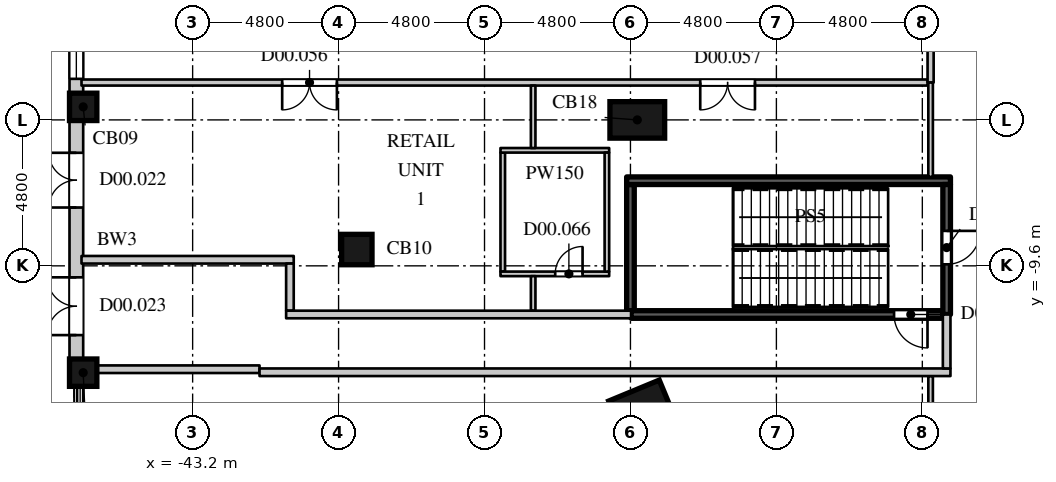
"""IFC4 building model, lengths in metres.
Left out: names, types, materials, properties, quantities, classifications, styles, units other than length and angle.
Written with IfcOpenShell. Run it as: python <this file> out.ifc"""

import sys

from ifc_helpers import new_model, si_unit, direction, frame, frame_2d, origin, origin_2d, place, context, subcontext, project, spatial, rectangle, extrude, element, fill, save


model = new_model("IFC4")
c1 = context("Model", 3, precision=1e-05, world=origin(), true_north=direction((0.0, 1.0)))
c2 = subcontext(c1, "Body", "Model", "MODEL_VIEW")
j1 = project(units=[si_unit("LENGTHUNIT", "METRE"), si_unit("PLANEANGLEUNIT", "RADIAN")], contexts=[c1])
p1 = place(None, origin())
s1 = spatial("IfcSite", under=j1, at=p1, CompositionType="ELEMENT")
p2 = place(p1, origin())
s2 = spatial("IfcBuilding", under=s1, at=p2, CompositionType="ELEMENT")
p3 = place(p2, origin())
s3 = spatial("IfcBuildingStorey", under=s2, at=p3, CompositionType="ELEMENT", Elevation=0.0)
p4 = place(p3, frame((-28.454, -14.257, 0.0), z_axis=(0.0, 0.0, 1.0), x_axis=(0.382683496864, -0.923879505795, 0.0)))
e1 = element("IfcColumn", 1, at=p4, inside=s3, PredefinedType="COLUMN", context=c2, shape_type="SweptSolid", body=[
    extrude(rectangle(XDim=1.2, YDim=1.8, at=origin_2d()), origin(), (0.0, 0.0, 1.0), 6.0),
])
p5 = place(p3, frame((-46.8, -13.114, 0.0), z_axis=(0.0, 0.0, 1.0), x_axis=(1.0, 0.0, 0.0)))
e2 = element("IfcColumn", 2, at=p5, inside=s3, PredefinedType="COLUMN", context=c2, shape_type="SweptSolid", body=[
    extrude(rectangle(XDim=0.9, YDim=0.9, at=origin_2d()), origin(), (0.0, 0.0, 1.0), 6.0),
])
p6 = place(p3, frame((-37.8, -9.064, 0.0), z_axis=(0.0, 0.0, 1.0), x_axis=(1.0, 0.0, 0.0)))
e3 = element("IfcColumn", 3, at=p6, inside=s3, PredefinedType="COLUMN", context=c2, shape_type="SweptSolid", body=[
    extrude(rectangle(XDim=1.0, YDim=1.0, at=origin_2d()), origin(), (0.0, 0.0, 1.0), 6.0),
])
p7 = place(p3, frame((-28.575, -4.8, 0.0), z_axis=(0.0, 0.0, 1.0), x_axis=(0.0, -1.0, 0.0)))
e4 = element("IfcColumn", 4, at=p7, inside=s3, PredefinedType="COLUMN", context=c2, shape_type="SweptSolid", body=[
    extrude(rectangle(XDim=1.2, YDim=1.8, at=origin_2d()), origin(), (0.0, 0.0, 1.0), 6.0),
])
p8 = place(p3, frame((-46.8, -4.371, 0.0), z_axis=(0.0, 0.0, 1.0), x_axis=(1.0, 0.0, 0.0)))
e5 = element("IfcColumn", 5, at=p8, inside=s3, PredefinedType="COLUMN", context=c2, shape_type="SweptSolid", body=[
    extrude(rectangle(XDim=0.9, YDim=0.9, at=origin_2d()), origin(), (0.0, 0.0, 1.0), 6.0),
])
p9 = place(p3, frame((-47.025, 3.921, 0.0), z_axis=(0.0, 0.0, 1.0), x_axis=(0.0, -1.0, 0.0)))
e6 = element("IfcWall", 6, at=p9, inside=s3, PredefinedType="ELEMENTEDWALL", context=c2, shape_type="SweptSolid", body=[
    extrude(rectangle(XDim=7.842, YDim=0.45, at=frame_2d((3.921, 0.0))), origin(), (0.0, 0.0, 1.0), 4.8),
])
p10 = place(p9, frame((0.961, 0.0, 0.0)))
e7 = element("IfcOpeningElement", 7, at=p10, cuts=e6, PredefinedType="OPENING", context=c2, shape_type="SweptSolid", body=[
    extrude(rectangle(XDim=2.0, YDim=2.7, at=frame_2d((1.0, 1.35))), frame((0.0, 0.235, 0.0), z_axis=(0.0, -1.0, 0.0), x_axis=(1.0, 0.0, 0.0)), (0.0, 0.0, 1.0), 0.47),
])
p11 = place(p9, frame((4.371, 0.0, 1.05)))
e8 = element("IfcOpeningElement", 8, at=p11, cuts=e6, PredefinedType="OPENING", context=c2, shape_type="SweptSolid", body=[
    extrude(rectangle(XDim=3.0, YDim=2.7, at=frame_2d((1.5, 1.35))), frame((0.0, 0.235, 0.0), z_axis=(0.0, -1.0, 0.0), x_axis=(1.0, 0.0, 0.0)), (0.0, 0.0, 1.0), 0.47),
])
p12 = place(p3, frame((-47.025, -4.821, 0.0), z_axis=(0.0, 0.0, 1.0), x_axis=(0.0, -1.0, 0.0)))
e9 = element("IfcWall", 9, at=p12, inside=s3, PredefinedType="ELEMENTEDWALL", context=c2, shape_type="SweptSolid", body=[
    extrude(rectangle(XDim=7.842, YDim=0.45, at=frame_2d((3.921, 0.0))), origin(), (0.0, 0.0, 1.0), 4.8),
])
p13 = place(p12, frame((1.061, 0.0, 0.0)))
e10 = element("IfcOpeningElement", 10, at=p13, cuts=e9, PredefinedType="OPENING", context=c2, shape_type="SweptSolid", body=[
    extrude(rectangle(XDim=1.8, YDim=2.7, at=frame_2d((0.9, 1.35))), frame((0.0, 0.235, 0.0), z_axis=(0.0, -1.0, 0.0), x_axis=(1.0, 0.0, 0.0)), (0.0, 0.0, 1.0), 0.47),
])
p14 = place(p12, frame((5.157, 0.0, 0.0)))
e11 = element("IfcOpeningElement", 11, at=p14, cuts=e9, PredefinedType="OPENING", context=c2, shape_type="SweptSolid", body=[
    extrude(rectangle(XDim=1.9, YDim=2.7, at=frame_2d((0.95, 1.35))), frame((0.0, 0.235, 0.0), z_axis=(0.0, -1.0, 0.0), x_axis=(1.0, 0.0, 0.0)), (0.0, 0.0, 1.0), 0.47),
])
p15 = place(p3, frame((-46.855, -3.571, 0.0), z_axis=(0.0, 0.0, 1.0), x_axis=(1.0, 0.0, 0.0)))
e12 = element("IfcWall", 12, at=p15, inside=s3, PredefinedType="PARTITIONING", context=c2, shape_type="SweptSolid", body=[
    extrude(rectangle(XDim=27.827, YDim=0.2, at=frame_2d((13.914, 0.0))), origin(), (0.0, 0.0, 1.0), 5.65),
])
p16 = place(p15, frame((6.6, 0.0, 0.0)))
e13 = element("IfcOpeningElement", 13, at=p16, cuts=e12, PredefinedType="OPENING", context=c2, shape_type="SweptSolid", body=[
    extrude(rectangle(XDim=1.8, YDim=2.4, at=frame_2d((0.9, 1.2))), frame((0.0, 0.11, 0.0), z_axis=(0.0, -1.0, 0.0), x_axis=(1.0, 0.0, 0.0)), (0.0, 0.0, 1.0), 0.22),
])
p17 = place(p15, frame((20.35, 0.0, 0.0)))
e14 = element("IfcOpeningElement", 14, at=p17, cuts=e12, PredefinedType="OPENING", context=c2, shape_type="SweptSolid", body=[
    extrude(rectangle(XDim=1.8, YDim=2.4, at=frame_2d((0.9, 1.2))), frame((0.0, 0.11, 0.0), z_axis=(0.0, -1.0, 0.0), x_axis=(1.0, 0.0, 0.0)), (0.0, 0.0, 1.0), 0.22),
])
p18 = place(p3, frame((-18.928, -3.571, 0.0), z_axis=(0.0, 0.0, 1.0), x_axis=(0.0, 1.0, 0.0)))
e15 = element("IfcWall", 15, at=p18, inside=s3, PredefinedType="PARTITIONING", context=c2, shape_type="SweptSolid", body=[
    extrude(rectangle(XDim=9.371, YDim=0.2, at=frame_2d((4.686, 0.0))), origin(), (0.0, 0.0, 1.0), 5.65),
])
p19 = place(p18, frame((3.95, 0.0, 0.0)))
e16 = element("IfcOpeningElement", 16, at=p19, cuts=e15, PredefinedType="OPENING", context=c2, shape_type="SweptSolid", body=[
    extrude(rectangle(XDim=1.5, YDim=2.2, at=frame_2d((0.75, 1.1))), frame((0.0, 0.11, 0.0), z_axis=(0.0, -1.0, 0.0), x_axis=(1.0, 0.0, 0.0)), (0.0, 0.0, 1.0), 0.22),
])
p20 = place(p3, frame((-33.0, -9.789, 0.0), z_axis=(0.0, 0.0, 1.0), x_axis=(0.0, 1.0, 0.0)))
e17 = element("IfcWall", 17, at=p20, inside=s3, PredefinedType="PARTITIONING", context=c2, shape_type="SweptSolid", body=[
    extrude(rectangle(XDim=3.914, YDim=0.15, at=frame_2d((1.957, 0.0))), origin(), (0.0, 0.0, 1.0), 5.65),
])
p21 = place(p3, frame((-33.075, -9.864, 0.0), z_axis=(0.0, 0.0, 1.0), x_axis=(1.0, 0.0, 0.0)))
e18 = element("IfcWall", 18, at=p21, inside=s3, PredefinedType="PARTITIONING", context=c2, shape_type="SweptSolid", body=[
    extrude(rectangle(XDim=3.575, YDim=0.15, at=frame_2d((1.788, 0.0))), origin(), (0.0, 0.0, 1.0), 5.65),
])
p22 = place(p21, frame((1.8, 0.0, 0.0)))
e19 = element("IfcOpeningElement", 19, at=p22, cuts=e18, PredefinedType="OPENING", context=c2, shape_type="SweptSolid", body=[
    extrude(rectangle(XDim=0.9, YDim=2.2, at=frame_2d((0.45, 1.1))), frame((0.0, 0.085, 0.0), z_axis=(0.0, -1.0, 0.0), x_axis=(1.0, 0.0, 0.0)), (0.0, 0.0, 1.0), 0.17),
])
p23 = place(p3, frame((-33.075, -5.8, 0.0), z_axis=(0.0, 0.0, 1.0), x_axis=(1.0, 0.0, 0.0)))
e20 = element("IfcWall", 20, at=p23, inside=s3, PredefinedType="PARTITIONING", context=c2, shape_type="SweptSolid", body=[
    extrude(rectangle(XDim=3.575, YDim=0.15, at=frame_2d((1.788, 0.0))), origin(), (0.0, 0.0, 1.0), 5.65),
])
p24 = place(p3, frame((-32.0, -11.075, 0.0), z_axis=(0.0, 0.0, 1.0), x_axis=(0.0, 1.0, 0.0)))
e21 = element("IfcWall", 21, at=p24, inside=s3, PredefinedType="PARTITIONING", context=c2, shape_type="SweptSolid", body=[
    extrude(rectangle(XDim=1.136, YDim=0.15, at=frame_2d((0.568, 0.0))), origin(), (0.0, 0.0, 1.0), 5.65),
])
p25 = place(p3, frame((-32.0, -5.725, 0.0), z_axis=(0.0, 0.0, 1.0), x_axis=(0.0, 1.0, 0.0)))
e22 = element("IfcWall", 22, at=p25, inside=s3, PredefinedType="PARTITIONING", context=c2, shape_type="SweptSolid", body=[
    extrude(rectangle(XDim=2.054, YDim=0.15, at=frame_2d((1.027, 0.0))), origin(), (0.0, 0.0, 1.0), 5.65),
])
p26 = place(p3, frame((-29.575, -9.789, 0.0), z_axis=(0.0, 0.0, 1.0), x_axis=(0.0, 1.0, 0.0)))
e23 = element("IfcWall", 23, at=p26, inside=s3, PredefinedType="PARTITIONING", context=c2, shape_type="SweptSolid", body=[
    extrude(rectangle(XDim=3.914, YDim=0.15, at=frame_2d((1.957, 0.0))), origin(), (0.0, 0.0, 1.0), 5.65),
])
p27 = place(p3, frame((-18.928, -29.925, 0.0), z_axis=(0.0, 0.0, 1.0), x_axis=(0.0, 1.0, 0.0)))
e24 = element("IfcWall", 24, at=p27, inside=s3, PredefinedType="PARTITIONING", context=c2, shape_type="SweptSolid", body=[
    extrude(rectangle(XDim=16.7, YDim=0.15, at=frame_2d((8.35, 0.0))), origin(), (0.0, 0.0, 1.0), 5.65),
])
p28 = place(p3, frame((-18.928, -6.675, 0.0), z_axis=(0.0, 0.0, 1.0), x_axis=(0.0, 1.0, 0.0)))
e25 = element("IfcWall", 25, at=p28, inside=s3, PredefinedType="PARTITIONING", context=c2, shape_type="SweptSolid", body=[
    extrude(rectangle(XDim=3.104, YDim=0.15, at=frame_2d((1.552, 0.0))), origin(), (0.0, 0.0, 1.0), 5.65),
])
p29 = place(p3, frame((-28.8, -11.075, 0.0), z_axis=(0.0, 0.0, 1.0), x_axis=(0.0, 1.0, 0.0)))
e26 = element("IfcWall", 26, at=p29, inside=s3, PredefinedType="SHEAR", context=c2, shape_type="SweptSolid", body=[
    extrude(rectangle(XDim=4.15, YDim=0.25, at=frame_2d((2.075, 0.0))), origin(), (0.0, 0.0, 1.0), 5.65),
])
p30 = place(p3, frame((-28.78, -11.2, 0.0), z_axis=(0.0, 0.0, 1.0), x_axis=(1.0, 0.0, 0.0)))
e27 = element("IfcWall", 27, at=p30, inside=s3, PredefinedType="SHEAR", context=c2, shape_type="SweptSolid", body=[
    extrude(rectangle(XDim=10.255, YDim=0.25, at=frame_2d((5.127, 0.0))), origin(), (0.0, 0.0, 1.0), 5.65),
])
p31 = place(p30, frame((8.65, 0.0, 0.0)))
e28 = element("IfcOpeningElement", 28, at=p31, cuts=e27, PredefinedType="OPENING", context=c2, shape_type="SweptSolid", body=[
    extrude(rectangle(XDim=1.1, YDim=2.2, at=frame_2d((0.55, 1.1))), frame((0.0, 0.135, 0.0), z_axis=(0.0, -1.0, 0.0), x_axis=(1.0, 0.0, 0.0)), (0.0, 0.0, 1.0), 0.27),
])
p32 = place(p3, frame((-28.925, -6.8, 0.0), z_axis=(0.0, 0.0, 1.0), x_axis=(1.0, 0.0, 0.0)))
e29 = element("IfcWall", 29, at=p32, inside=s3, PredefinedType="SHEAR", context=c2, shape_type="SweptSolid", body=[
    extrude(rectangle(XDim=10.65, YDim=0.25, at=frame_2d((5.325, 0.0))), origin(), (0.0, 0.0, 1.0), 5.65),
])
p33 = place(p3, frame((-18.4, -11.2, 0.0), z_axis=(0.0, 0.0, 1.0), x_axis=(0.0, 1.0, 0.0)))
e30 = element("IfcWall", 30, at=p33, inside=s3, PredefinedType="SHEAR", context=c2, shape_type="SweptSolid", body=[
    extrude(rectangle(XDim=4.275, YDim=0.25, at=frame_2d((2.137, 0.0))), origin(), (0.0, 0.0, 1.0), 5.65),
])
p34 = place(p33, frame((1.65, 0.0, 0.0)))
e31 = element("IfcOpeningElement", 31, at=p34, cuts=e30, PredefinedType="OPENING", context=c2, shape_type="SweptSolid", body=[
    extrude(rectangle(XDim=1.1, YDim=2.2, at=frame_2d((0.55, 1.1))), frame((0.0, 0.135, 0.0), z_axis=(0.0, -1.0, 0.0), x_axis=(1.0, 0.0, 0.0)), (0.0, 0.0, 1.0), 0.27),
])
p35 = place(p3, frame((-46.35, -13.0, 0.0), z_axis=(0.0, 0.0, 1.0), x_axis=(1.0, 0.0, 0.0)))
e32 = element("IfcWall", 32, at=p35, inside=s3, PredefinedType="PARTITIONING", context=c2, shape_type="SweptSolid", body=[
    extrude(rectangle(XDim=5.35, YDim=0.25, at=frame_2d((2.675, 0.0))), origin(), (0.0, 0.0, 1.0), 5.65),
])
p36 = place(p3, frame((-46.855, -9.4, 0.0), z_axis=(0.0, 0.0, 1.0), x_axis=(1.0, 0.0, 0.0)))
e33 = element("IfcWall", 33, at=p36, inside=s3, PredefinedType="PARTITIONING", context=c2, shape_type="SweptSolid", body=[
    extrude(rectangle(XDim=6.98, YDim=0.25, at=frame_2d((3.49, 0.0))), origin(), (0.0, 0.0, 1.0), 5.65),
])
p37 = place(p3, frame((-41.0, -13.1, 0.0), z_axis=(0.0, 0.0, 1.0), x_axis=(1.0, 0.0, 0.0)))
e34 = element("IfcWall", 34, at=p37, inside=s3, PredefinedType="PARTITIONING", context=c2, shape_type="SweptSolid", body=[
    extrude(rectangle(XDim=22.725, YDim=0.25, at=frame_2d((11.363, 0.0))), origin(), (0.0, 0.0, 1.0), 5.65),
])
p38 = place(p3, frame((-40.0, -11.075, 0.0), z_axis=(0.0, 0.0, 1.0), x_axis=(0.0, 1.0, 0.0)))
e35 = element("IfcWall", 35, at=p38, inside=s3, PredefinedType="PARTITIONING", context=c2, shape_type="SweptSolid", body=[
    extrude(rectangle(XDim=1.55, YDim=0.25, at=frame_2d((0.775, 0.0))), origin(), (0.0, 0.0, 1.0), 5.65),
])
p39 = place(p3, frame((-40.125, -11.2, 0.0), z_axis=(0.0, 0.0, 1.0), x_axis=(1.0, 0.0, 0.0)))
e36 = element("IfcWall", 36, at=p39, inside=s3, PredefinedType="PARTITIONING", context=c2, shape_type="SweptSolid", body=[
    extrude(rectangle(XDim=11.345, YDim=0.25, at=frame_2d((5.672, 0.0))), origin(), (0.0, 0.0, 1.0), 5.65),
])
p40 = place(p3, frame((-18.4, -12.975, 0.0), z_axis=(0.0, 0.0, 1.0), x_axis=(0.0, 1.0, 0.0)))
e37 = element("IfcWall", 37, at=p40, inside=s3, PredefinedType="PARTITIONING", context=c2, shape_type="SweptSolid", body=[
    extrude(rectangle(XDim=1.775, YDim=0.25, at=frame_2d((0.888, 0.0))), origin(), (0.0, 0.0, 1.0), 5.65),
])
p41 = place(p11, origin())
e38 = element("IfcWindow", 38, at=p41, inside=s3, PartitioningType="SINGLE_PANEL", PredefinedType="WINDOW", context=c2, shape_type="SweptSolid", body=[
    extrude(rectangle(XDim=3.0, YDim=2.7, at=frame_2d((1.5, 1.35))), frame((0.0, 0.135, 0.0), z_axis=(0.0, -1.0, 0.0), x_axis=(1.0, 0.0, 0.0)), (0.0, 0.0, 1.0), 0.06),
])
fill(e8, e38)
p42 = place(p13, frame((1.8, 0.0, 0.0), z_axis=(0.0, 0.0, 1.0), x_axis=(-1.0, 0.0, 0.0)))
e39 = element("IfcDoor", 39, at=p42, inside=s3, OperationType="DOUBLE_DOOR_SINGLE_SWING", PredefinedType="DOOR", context=c2, shape_type="SweptSolid", body=[
    extrude(rectangle(XDim=1.8, YDim=2.7, at=frame_2d((0.9, 1.35))), frame((0.0, -0.08, 0.0), z_axis=(0.0, -1.0, 0.0), x_axis=(1.0, 0.0, 0.0)), (0.0, 0.0, 1.0), 0.05),
])
fill(e10, e39)
p43 = place(p14, frame((1.9, 0.0, 0.0), z_axis=(0.0, 0.0, 1.0), x_axis=(-1.0, 0.0, 0.0)))
e40 = element("IfcDoor", 40, at=p43, inside=s3, OperationType="DOUBLE_DOOR_SINGLE_SWING", PredefinedType="DOOR", context=c2, shape_type="SweptSolid", body=[
    extrude(rectangle(XDim=1.9, YDim=2.7, at=frame_2d((0.95, 1.35))), frame((0.0, -0.08, 0.0), z_axis=(0.0, -1.0, 0.0), x_axis=(1.0, 0.0, 0.0)), (0.0, 0.0, 1.0), 0.05),
])
fill(e11, e40)
p44 = place(p16, origin())
e41 = element("IfcDoor", 41, at=p44, inside=s3, OperationType="DOUBLE_DOOR_SINGLE_SWING", PredefinedType="DOOR", context=c2, shape_type="SweptSolid", body=[
    extrude(rectangle(XDim=1.8, YDim=2.4, at=frame_2d((0.9, 1.2))), frame((0.0, 0.025, 0.0), z_axis=(0.0, -1.0, 0.0), x_axis=(1.0, 0.0, 0.0)), (0.0, 0.0, 1.0), 0.05),
])
fill(e13, e41)
p45 = place(p17, origin())
e42 = element("IfcDoor", 42, at=p45, inside=s3, OperationType="DOUBLE_DOOR_SINGLE_SWING", PredefinedType="DOOR", context=c2, shape_type="SweptSolid", body=[
    extrude(rectangle(XDim=1.8, YDim=2.4, at=frame_2d((0.9, 1.2))), frame((0.0, 0.025, 0.0), z_axis=(0.0, -1.0, 0.0), x_axis=(1.0, 0.0, 0.0)), (0.0, 0.0, 1.0), 0.05),
])
fill(e14, e42)
p46 = place(p22, origin())
e43 = element("IfcDoor", 43, at=p46, inside=s3, OperationType="SINGLE_SWING_RIGHT", PredefinedType="DOOR", context=c2, shape_type="SweptSolid", body=[
    extrude(rectangle(XDim=0.9, YDim=2.2, at=frame_2d((0.45, 1.1))), frame((0.0, 0.025, 0.0), z_axis=(0.0, -1.0, 0.0), x_axis=(1.0, 0.0, 0.0)), (0.0, 0.0, 1.0), 0.05),
])
fill(e19, e43)
p47 = place(p34, origin())
e44 = element("IfcDoor", 44, at=p47, inside=s3, OperationType="SINGLE_SWING_LEFT", PredefinedType="DOOR", context=c2, shape_type="SweptSolid", body=[
    extrude(rectangle(XDim=1.1, YDim=2.2, at=frame_2d((0.55, 1.1))), frame((0.0, 0.025, 0.0), z_axis=(0.0, -1.0, 0.0), x_axis=(1.0, 0.0, 0.0)), (0.0, 0.0, 1.0), 0.05),
])
fill(e31, e44)
p48 = place(p31, origin())
e45 = element("IfcDoor", 45, at=p48, inside=s3, OperationType="SINGLE_SWING_LEFT", PredefinedType="DOOR", context=c2, shape_type="SweptSolid", body=[
    extrude(rectangle(XDim=1.1, YDim=2.2, at=frame_2d((0.55, 1.1))), frame((0.0, 0.025, 0.0), z_axis=(0.0, -1.0, 0.0), x_axis=(1.0, 0.0, 0.0)), (0.0, 0.0, 1.0), 0.05),
])
fill(e28, e45)
save(model, sys.argv[1])
